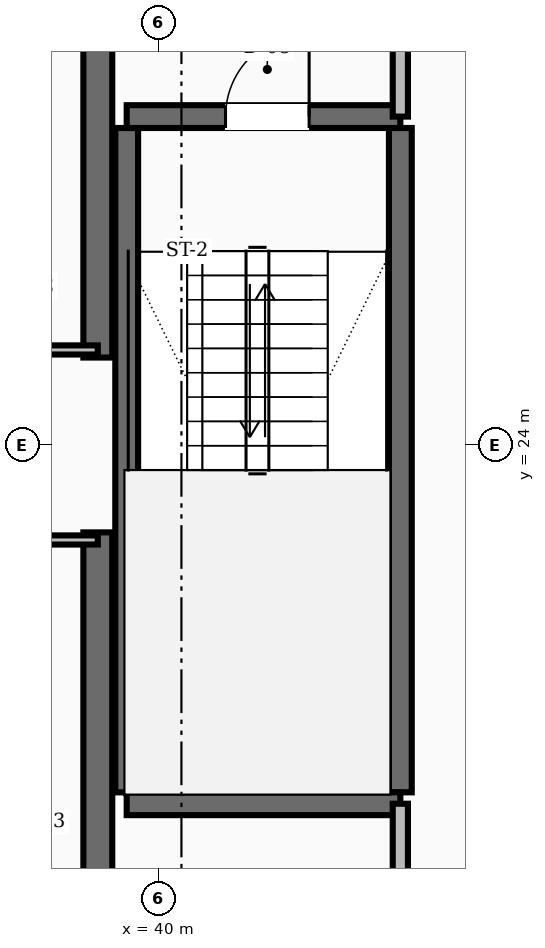
"""IFC4 building model, lengths in metres.
Left out: names, types, materials, properties, quantities, classifications, styles, units other than length and angle.
Written with IfcOpenShell. Run it as: python <this file> out.ifc"""

import sys

from ifc_helpers import new_model, si_unit, direction, frame, frame_2d, origin, place, context, subcontext, project, spatial, rectangle, extrude, element, fill, save


model = new_model("IFC4")
c1 = context("Model", 3, precision=1e-05, world=origin(), true_north=direction((0.0, 1.0)))
c2 = subcontext(c1, "Body", "Model", "MODEL_VIEW")
j1 = project(units=[si_unit("LENGTHUNIT", "METRE"), si_unit("PLANEANGLEUNIT", "RADIAN")], contexts=[c1])
p1 = place(None, origin())
s1 = spatial("IfcSite", under=j1, at=p1, CompositionType="ELEMENT")
p2 = place(p1, origin())
s2 = spatial("IfcBuilding", under=s1, at=p2, CompositionType="ELEMENT")
p3 = place(p2, frame((0.0, 0.0, 98.8)))
s3 = spatial("IfcBuildingStorey", under=s2, at=p3, CompositionType="ELEMENT", Elevation=98.8)
for number, where, z_axis, x_axis in (
    (1, (39.2, 16.55, 0.0), (0.0, 0.0, 1.0), (0.0, 1.0, 0.0)),
    (2, (39.2, 25.15, 0.0), (0.0, 0.0, 1.0), (0.0, 1.0, 0.0)),
):
    element("IfcWall", number, at=place(p3, frame(where, z_axis=z_axis, x_axis=x_axis)), inside=s3, PredefinedType="SHEAR", context=c2, shape_type="SweptSolid", body=[
        extrude(rectangle(XDim=6.3, YDim=0.38, at=frame_2d((3.15, 0.0))), origin(), (0.0, 0.0, 1.0), 3.6),
    ])
for number, where, z_axis, x_axis in (
    (3, (43.18, 19.43, 0.0), (0.0, 0.0, 1.0), (0.0, 1.0, 0.0)),
    (4, (39.58, 19.43, 0.0), (0.0, 0.0, 1.0), (0.0, 1.0, 0.0)),
):
    element("IfcWall", number, at=place(p3, frame(where, z_axis=z_axis, x_axis=x_axis)), inside=s3, PredefinedType="SHEAR", context=c2, shape_type="SweptSolid", body=[
        extrude(rectangle(XDim=8.74, YDim=0.3, at=frame_2d((4.37, 0.0))), origin(), (0.0, 0.0, 1.0), 3.6),
    ])
p4 = place(p3, frame((39.58, 19.28, 0.0), z_axis=(0.0, 0.0, 1.0), x_axis=(1.0, 0.0, 0.0)))
e5 = element("IfcWall", 5, at=p4, inside=s3, PredefinedType="SHEAR", context=c2, shape_type="SweptSolid", body=[
    extrude(rectangle(XDim=3.6, YDim=0.3, at=frame_2d((1.8, 0.0))), origin(), (0.0, 0.0, 1.0), 3.6),
])
p5 = place(p3, frame((39.58, 28.32, 0.0), z_axis=(0.0, 0.0, 1.0), x_axis=(1.0, 0.0, 0.0)))
e6 = element("IfcWall", 6, at=p5, inside=s3, PredefinedType="SHEAR", context=c2, shape_type="SweptSolid", body=[
    extrude(rectangle(XDim=3.6, YDim=0.3, at=frame_2d((1.8, 0.0))), origin(), (0.0, 0.0, 1.0), 3.6),
])
p6 = place(p5, frame((1.3, 0.0, 0.0)))
e7 = element("IfcOpeningElement", 7, at=p6, cuts=e6, PredefinedType="OPENING", context=c2, shape_type="SweptSolid", body=[
    extrude(rectangle(XDim=1.1, YDim=2.1, at=frame_2d((0.55, 1.05))), frame((0.0, 0.16, 0.0), z_axis=(0.0, -1.0, 0.0), x_axis=(1.0, 0.0, 0.0)), (0.0, 0.0, 1.0), 0.32),
])
p7 = place(p3, frame((43.18, 28.32, 0.0), z_axis=(0.0, 0.0, 1.0), x_axis=(0.0, 1.0, 0.0)))
e8 = element("IfcWall", 8, at=p7, inside=s3, PredefinedType="SOLIDWALL", context=c2, shape_type="SweptSolid", body=[
    extrude(rectangle(XDim=3.13, YDim=0.2, at=frame_2d((1.565, 0.0))), origin(), (0.0, 0.0, 1.0), 2.71),
])
p8 = place(p7, frame((1.015, 0.0, 0.0)))
e9 = element("IfcOpeningElement", 9, at=p8, cuts=e8, PredefinedType="OPENING", context=c2, shape_type="SweptSolid", body=[
    extrude(rectangle(XDim=1.1, YDim=2.1, at=frame_2d((0.55, 1.05))), frame((0.0, 0.11, 0.0), z_axis=(0.0, -1.0, 0.0), x_axis=(1.0, 0.0, 0.0)), (0.0, 0.0, 1.0), 0.22),
])
p9 = place(p3, frame((43.18, 16.55, 0.0), z_axis=(0.0, 0.0, 1.0), x_axis=(0.0, 1.0, 0.0)))
e10 = element("IfcWall", 10, at=p9, inside=s3, PredefinedType="SOLIDWALL", context=c2, shape_type="SweptSolid", body=[
    extrude(rectangle(XDim=2.73, YDim=0.2, at=frame_2d((1.365, 0.0))), origin(), (0.0, 0.0, 1.0), 2.71),
])
p10 = place(p9, frame((0.89, 0.0, 0.0)))
e11 = element("IfcOpeningElement", 11, at=p10, cuts=e10, PredefinedType="OPENING", context=c2, shape_type="SweptSolid", body=[
    extrude(rectangle(XDim=0.95, YDim=2.1, at=frame_2d((0.475, 1.05))), frame((0.0, 0.11, 0.0), z_axis=(0.0, -1.0, 0.0), x_axis=(1.0, 0.0, 0.0)), (0.0, 0.0, 1.0), 0.22),
])
for number, where, z_axis, x_axis in (
    (12, (37.4, 25.25, 0.0), (0.0, 0.0, 1.0), (1.0, 0.0, 0.0)),
    (13, (37.4, 22.75, 0.0), (0.0, 0.0, 1.0), (1.0, 0.0, 0.0)),
):
    element("IfcWall", number, at=place(p3, frame(where, z_axis=z_axis, x_axis=x_axis)), inside=s3, PredefinedType="PARTITIONING", context=c2, shape_type="SweptSolid", body=[
        extrude(rectangle(XDim=1.8, YDim=0.12, at=frame_2d((0.9, 0.0))), origin(), (0.0, 0.0, 1.0), 2.71),
    ])
p11 = place(p6, origin())
e14 = element("IfcDoor", 14, at=p11, inside=s3, OperationType="SINGLE_SWING_RIGHT", PredefinedType="DOOR", context=c2, shape_type="SweptSolid", body=[
    extrude(rectangle(XDim=1.1, YDim=2.1, at=frame_2d((0.55, 1.05))), frame((0.0, 0.025, 0.0), z_axis=(0.0, -1.0, 0.0), x_axis=(1.0, 0.0, 0.0)), (0.0, 0.0, 1.0), 0.05),
])
fill(e7, e14)
save(model, sys.argv[1])
